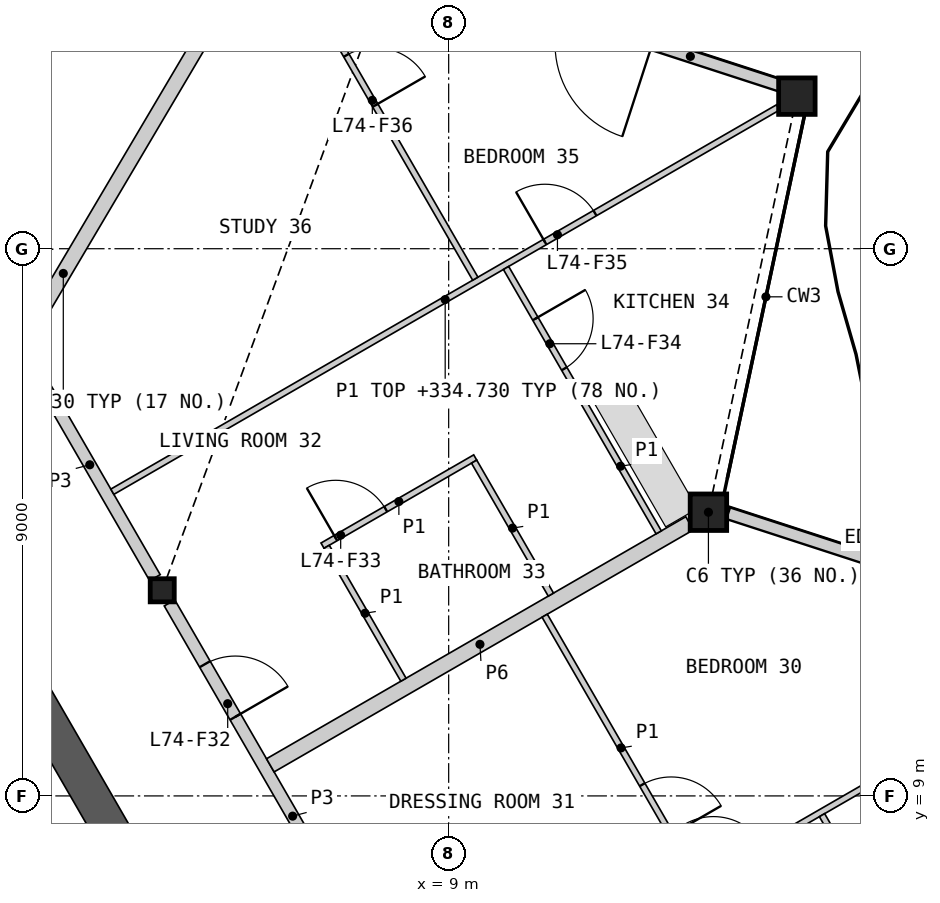
"""IFC4 building model, lengths in metres.
Left out: names, types, materials, properties, quantities, classifications, styles, units other than length and angle.
Written with IfcOpenShell. Run it as: python <this file> out.ifc"""

import sys

from ifc_helpers import new_model, si_unit, direction, frame, frame_2d, origin, origin_2d, place, context, subcontext, project, spatial, rectangle, hollow_rectangle, i_section, extrude, element, fill, save


model = new_model("IFC4")
c1 = context("Model", 3, precision=1e-05, world=origin(), true_north=direction((0.0, 1.0)))
c2 = subcontext(c1, "Body", "Model", "MODEL_VIEW")
j1 = project(units=[si_unit("LENGTHUNIT", "METRE"), si_unit("PLANEANGLEUNIT", "RADIAN")], contexts=[c1])
p1 = place(None, origin())
s1 = spatial("IfcSite", under=j1, at=p1, CompositionType="ELEMENT")
p2 = place(p1, origin())
s2 = spatial("IfcBuilding", under=s1, at=p2, CompositionType="ELEMENT")
p3 = place(p2, frame((0.0, 0.0, 332.4)))
s3 = spatial("IfcBuildingStorey", under=s2, at=p3, CompositionType="ELEMENT", Elevation=332.4)
for number, where, z_axis, x_axis in (
    (1, (13.272, 13.666, 0.0), (0.0, 0.0, 1.0), (1.0, 0.0, 0.0)),
    (2, (14.727, 20.509, 0.0), (0.0, 0.0, 1.0), (1.0, 0.0, 0.0)),
):
    element("IfcColumn", number, at=place(p3, frame(where, z_axis=z_axis, x_axis=x_axis)), inside=s3, PredefinedType="COLUMN", context=c2, shape_type="SweptSolid", body=[
        extrude(hollow_rectangle(XDim=0.6, YDim=0.6, WallThickness=0.04, at=origin_2d()), origin(), (0.0, 0.0, 1.0), 3.4),
    ])
p4 = place(p3, frame((4.289, 12.382, 0.0), z_axis=(0.0, 0.0, 1.0), x_axis=(1.0, 0.0, 0.0)))
e3 = element("IfcColumn", 3, at=p4, inside=s3, PredefinedType="COLUMN", context=c2, shape_type="SweptSolid", body=[
    extrude(i_section(OverallWidth=0.396, OverallDepth=0.381, WebThickness=0.019, FlangeThickness=0.03, at=origin_2d()), origin(), (0.0, 0.0, 1.0), 3.4),
])
p5 = place(p3, frame((19.697, 11.667, 0.0), z_axis=(0.0, 0.0, 1.0), x_axis=(-0.951053926112, 0.309024966026, 0.0)))
e4 = element("IfcWall", 4, at=p5, inside=s3, PredefinedType="SOLIDWALL", context=c2, shape_type="SweptSolid", body=[
    extrude(rectangle(XDim=6.414, YDim=0.2, at=frame_2d((3.207, 0.0))), origin(), (0.0, 0.0, 1.0), 2.488),
])
p6 = place(p5, frame((2.262, 0.0, 0.0)))
e5 = element("IfcOpeningElement", 5, at=p6, cuts=e4, PredefinedType="OPENING", context=c2, shape_type="SweptSolid", body=[
    extrude(rectangle(XDim=1.6, YDim=2.25, at=frame_2d((0.8, 1.125))), frame((0.0, 0.11, 0.0), z_axis=(0.0, -1.0, 0.0), x_axis=(1.0, 0.0, 0.0)), (0.0, 0.0, 1.0), 0.22),
])
p7 = place(p3, frame((14.501, 20.667, 0.0), z_axis=(0.0, 0.0, 1.0), x_axis=(-0.951049165164, 0.309039617915, 0.0)))
e6 = element("IfcWall", 6, at=p7, inside=s3, PredefinedType="SOLIDWALL", context=c2, shape_type="SweptSolid", body=[
    extrude(rectangle(XDim=6.417, YDim=0.2, at=frame_2d((3.208, 0.0))), origin(), (0.0, 0.0, 1.0), 2.488),
])
p8 = place(p7, frame((2.262, 0.0, 0.0)))
e7 = element("IfcOpeningElement", 7, at=p8, cuts=e6, PredefinedType="OPENING", context=c2, shape_type="SweptSolid", body=[
    extrude(rectangle(XDim=1.6, YDim=2.25, at=frame_2d((0.8, 1.125))), frame((0.0, 0.11, 0.0), z_axis=(0.0, -1.0, 0.0), x_axis=(1.0, 0.0, 0.0)), (0.0, 0.0, 1.0), 0.22),
])
p9 = place(p3, frame((8.841, -0.902, 0.0), z_axis=(0.0, 0.0, 1.0), x_axis=(-0.499995618375, 0.866027933502, 0.0)))
e8 = element("IfcWall", 8, at=p9, inside=s3, PredefinedType="SHEAR", context=c2, shape_type="SweptSolid", body=[
    extrude(rectangle(XDim=14.571, YDim=0.6, at=frame_2d((7.285, 0.0))), origin(), (0.0, 0.0, 1.0), 3.1),
])
p10 = place(p3, frame((1.899, 16.303, 0.0), z_axis=(0.0, 0.0, 1.0), x_axis=(0.508895604687, 0.860828242758, 0.0)))
e9 = element("IfcWall", 9, at=p10, inside=s3, PredefinedType="PARTITIONING", context=c2, shape_type="SweptSolid", body=[
    extrude(rectangle(XDim=14.986, YDim=0.25, at=frame_2d((7.493, 0.0))), origin(), (0.0, 0.0, 1.0), 2.33),
])
p11 = place(p3, frame((4.409, 12.174, 0.0), z_axis=(0.0, 0.0, 1.0), x_axis=(0.499984266882, -0.866034487114, 0.0)))
e10 = element("IfcWall", 10, at=p11, inside=s3, PredefinedType="PARTITIONING", context=c2, shape_type="SweptSolid", body=[
    extrude(rectangle(XDim=8.099, YDim=0.2, at=frame_2d((4.049, 0.0))), origin(), (0.0, 0.0, 1.0), 3.1),
])
p12 = place(p11, frame((1.164, 0.0, 0.0)))
e11 = element("IfcOpeningElement", 11, at=p12, cuts=e10, PredefinedType="OPENING", context=c2, shape_type="SweptSolid", body=[
    extrude(rectangle(XDim=1.0, YDim=2.1, at=frame_2d((0.5, 1.05))), frame((0.0, 0.11, 0.0), z_axis=(0.0, -1.0, 0.0), x_axis=(1.0, 0.0, 0.0)), (0.0, 0.0, 1.0), 0.22),
])
p13 = place(p3, frame((6.067, 9.503, 0.0), z_axis=(0.0, 0.0, 1.0), x_axis=(0.866032392051, 0.499987895772, 0.0)))
e12 = element("IfcWall", 12, at=p13, inside=s3, PredefinedType="PARTITIONING", context=c2, shape_type="SweptSolid", body=[
    extrude(rectangle(XDim=7.962, YDim=0.25, at=frame_2d((3.981, 0.0))), origin(), (0.0, 0.0, 1.0), 2.33),
])
p14 = place(p3, frame((2.025, 16.303, 0.0), z_axis=(0.0, 0.0, 1.0), x_axis=(0.499978750566, -0.866037671803, 0.0)))
e13 = element("IfcWall", 13, at=p14, inside=s3, PredefinedType="PARTITIONING", context=c2, shape_type="SweptSolid", body=[
    extrude(rectangle(XDim=4.288, YDim=0.2, at=frame_2d((2.144, 0.0))), origin(), (0.0, 0.0, 1.0), 3.1),
])
p15 = place(p3, frame((3.469, 14.003, 0.0), z_axis=(0.0, 0.0, 1.0), x_axis=(0.866021563384, 0.50000665171, 0.0)))
e14 = element("IfcWall", 14, at=p15, inside=s3, PredefinedType="PARTITIONING", context=c2, shape_type="SweptSolid", body=[
    extrude(rectangle(XDim=12.641, YDim=0.1, at=frame_2d((6.321, 0.0))), origin(), (0.0, 0.0, 1.0), 2.33),
])
p16 = place(p15, frame((8.215, 0.0, 0.0)))
e15 = element("IfcOpeningElement", 15, at=p16, cuts=e14, PredefinedType="OPENING", context=c2, shape_type="SweptSolid", body=[
    extrude(rectangle(XDim=0.95, YDim=2.1, at=frame_2d((0.475, 1.05))), frame((0.0, 0.06, 0.0), z_axis=(0.0, -1.0, 0.0), x_axis=(1.0, 0.0, 0.0)), (0.0, 0.0, 1.0), 0.12),
])
p17 = place(p3, frame((8.786, 5.073, 0.0), z_axis=(0.0, 0.0, 1.0), x_axis=(0.86602139559, 0.500006942333, 0.0)))
e16 = element("IfcWall", 16, at=p17, inside=s3, PredefinedType="PARTITIONING", context=c2, shape_type="SweptSolid", body=[
    extrude(rectangle(XDim=12.505, YDim=0.1, at=frame_2d((6.252, 0.0))), origin(), (0.0, 0.0, 1.0), 2.33),
])
p18 = place(p17, frame((5.275, 0.0, 0.0)))
e17 = element("IfcOpeningElement", 17, at=p18, cuts=e16, PredefinedType="OPENING", context=c2, shape_type="SweptSolid", body=[
    extrude(rectangle(XDim=0.95, YDim=2.1, at=frame_2d((0.475, 1.05))), frame((0.0, 0.06, 0.0), z_axis=(0.0, -1.0, 0.0), x_axis=(1.0, 0.0, 0.0)), (0.0, 0.0, 1.0), 0.12),
])
p19 = place(p3, frame((1.098, 19.16, 0.0), z_axis=(0.0, 0.0, 1.0), x_axis=(0.156426176129, 0.987689653394, 0.0)))
e18 = element("IfcWall", 18, at=p19, inside=s3, PredefinedType="PARTITIONING", context=c2, shape_type="SweptSolid", body=[
    extrude(rectangle(XDim=12.358, YDim=0.1, at=frame_2d((6.179, 0.0))), origin(), (0.0, 0.0, 1.0), 2.33),
])
p20 = place(p19, frame((7.255, 0.0, 0.0)))
e19 = element("IfcOpeningElement", 19, at=p20, cuts=e18, PredefinedType="OPENING", context=c2, shape_type="SweptSolid", body=[
    extrude(rectangle(XDim=0.95, YDim=2.1, at=frame_2d((0.475, 1.05))), frame((0.0, 0.06, 0.0), z_axis=(0.0, -1.0, 0.0), x_axis=(1.0, 0.0, 0.0)), (0.0, 0.0, 1.0), 0.12),
])
p21 = place(p3, frame((6.127, 23.241, 0.0), z_axis=(0.0, 0.0, 1.0), x_axis=(0.500021410345, -0.866013042163, 0.0)))
e20 = element("IfcWall", 20, at=p21, inside=s3, PredefinedType="PARTITIONING", context=c2, shape_type="SweptSolid", body=[
    extrude(rectangle(XDim=6.621, YDim=0.1, at=frame_2d((3.311, 0.0))), origin(), (0.0, 0.0, 1.0), 2.33),
])
p22 = place(p21, frame((2.379, 0.0, 0.0)))
e21 = element("IfcOpeningElement", 21, at=p22, cuts=e20, PredefinedType="OPENING", context=c2, shape_type="SweptSolid", body=[
    extrude(rectangle(XDim=0.95, YDim=2.1, at=frame_2d((0.475, 1.05))), frame((0.0, 0.06, 0.0), z_axis=(0.0, -1.0, 0.0), x_axis=(1.0, 0.0, 0.0)), (0.0, 0.0, 1.0), 0.12),
])
p23 = place(p3, frame((10.579, 11.964, 0.0), z_axis=(0.0, 0.0, 1.0), x_axis=(0.499972176429, -0.866041467135, 0.0)))
e22 = element("IfcWall", 22, at=p23, inside=s3, PredefinedType="PARTITIONING", context=c2, shape_type="SweptSolid", body=[
    extrude(rectangle(XDim=5.021, YDim=0.1, at=frame_2d((2.511, 0.0))), origin(), (0.0, 0.0, 1.0), 2.33),
])
p24 = place(p23, frame((3.209, 0.0, 0.0)))
e23 = element("IfcOpeningElement", 23, at=p24, cuts=e22, PredefinedType="OPENING", context=c2, shape_type="SweptSolid", body=[
    extrude(rectangle(XDim=0.95, YDim=2.1, at=frame_2d((0.475, 1.05))), frame((0.0, 0.06, 0.0), z_axis=(0.0, -1.0, 0.0), x_axis=(1.0, 0.0, 0.0)), (0.0, 0.0, 1.0), 0.12),
])
p25 = place(p3, frame((9.944, 17.684, 0.0), z_axis=(0.0, 0.0, 1.0), x_axis=(0.499972176429, -0.866041467135, 0.0)))
e24 = element("IfcWall", 24, at=p25, inside=s3, PredefinedType="PARTITIONING", context=c2, shape_type="SweptSolid", body=[
    extrude(rectangle(XDim=5.021, YDim=0.1, at=frame_2d((2.511, 0.0))), origin(), (0.0, 0.0, 1.0), 2.33),
])
p26 = place(p25, frame((0.964, 0.0, 0.0)))
e25 = element("IfcOpeningElement", 25, at=p26, cuts=e24, PredefinedType="OPENING", context=c2, shape_type="SweptSolid", body=[
    extrude(rectangle(XDim=0.95, YDim=2.1, at=frame_2d((0.475, 1.05))), frame((0.0, 0.06, 0.0), z_axis=(0.0, -1.0, 0.0), x_axis=(1.0, 0.0, 0.0)), (0.0, 0.0, 1.0), 0.12),
])
p27 = place(p3, frame((15.14, 8.683, 0.0), z_axis=(0.0, 0.0, 1.0), x_axis=(0.499987849973, -0.866032418492, 0.0)))
e26 = element("IfcWall", 26, at=p27, inside=s3, PredefinedType="PARTITIONING", context=c2, shape_type="SweptSolid", body=[
    extrude(rectangle(XDim=5.096, YDim=0.1, at=frame_2d((2.548, 0.0))), origin(), (0.0, 0.0, 1.0), 2.33),
])
p28 = place(p27, frame((0.554, 0.0, 0.0)))
e27 = element("IfcOpeningElement", 27, at=p28, cuts=e26, PredefinedType="OPENING", context=c2, shape_type="SweptSolid", body=[
    extrude(rectangle(XDim=0.95, YDim=2.1, at=frame_2d((0.475, 1.05))), frame((0.0, 0.06, 0.0), z_axis=(0.0, -1.0, 0.0), x_axis=(1.0, 0.0, 0.0)), (0.0, 0.0, 1.0), 0.12),
])
p29 = place(p3, frame((6.925, 13.116, 0.0), z_axis=(0.0, 0.0, 1.0), x_axis=(0.866032775405, 0.499987231761, 0.0)))
e28 = element("IfcWall", 28, at=p29, inside=s3, PredefinedType="PARTITIONING", context=c2, shape_type="SweptSolid", body=[
    extrude(rectangle(XDim=2.9, YDim=0.1, at=frame_2d((1.45, 0.0))), origin(), (0.0, 0.0, 1.0), 2.33),
])
p30 = place(p29, frame((0.25, 0.0, 0.0)))
e29 = element("IfcOpeningElement", 29, at=p30, cuts=e28, PredefinedType="OPENING", context=c2, shape_type="SweptSolid", body=[
    extrude(rectangle(XDim=0.95, YDim=2.1, at=frame_2d((0.475, 1.05))), frame((0.0, 0.06, 0.0), z_axis=(0.0, -1.0, 0.0), x_axis=(1.0, 0.0, 0.0)), (0.0, 0.0, 1.0), 0.12),
])
for number, where, z_axis, x_axis in (
    (30, (9.418, 14.498, 0.0), (0.0, 0.0, 1.0), (0.5, -0.866, 0.0)),
    (31, (6.994, 13.098, 0.0), (0.0, 0.0, 1.0), (0.5, -0.866, 0.0)),
):
    element("IfcWall", number, at=place(p3, frame(where, z_axis=z_axis, x_axis=x_axis)), inside=s3, PredefinedType="PARTITIONING", context=c2, shape_type="SweptSolid", body=[
        extrude(rectangle(XDim=2.525, YDim=0.1, at=frame_2d((1.262, 0.0))), origin(), (0.0, 0.0, 1.0), 2.33),
    ])
p31 = place(p24, origin())
e32 = element("IfcDoor", 32, at=p31, inside=s3, OperationType="SINGLE_SWING_RIGHT", PredefinedType="DOOR", context=c2, shape_type="SweptSolid", body=[
    extrude(rectangle(XDim=0.95, YDim=2.1, at=frame_2d((0.475, 1.05))), frame((0.0, 0.025, 0.0), z_axis=(0.0, -1.0, 0.0), x_axis=(1.0, 0.0, 0.0)), (0.0, 0.0, 1.0), 0.05),
])
fill(e23, e32)
p32 = place(p12, origin())
e33 = element("IfcDoor", 33, at=p32, inside=s3, OperationType="SINGLE_SWING_RIGHT", PredefinedType="DOOR", context=c2, shape_type="SweptSolid", body=[
    extrude(rectangle(XDim=1.0, YDim=2.1, at=frame_2d((0.5, 1.05))), frame((0.0, 0.025, 0.0), z_axis=(0.0, -1.0, 0.0), x_axis=(1.0, 0.0, 0.0)), (0.0, 0.0, 1.0), 0.05),
])
fill(e11, e33)
p33 = place(p30, origin())
e34 = element("IfcDoor", 34, at=p33, inside=s3, OperationType="SINGLE_SWING_LEFT", PredefinedType="DOOR", context=c2, shape_type="SweptSolid", body=[
    extrude(rectangle(XDim=0.95, YDim=2.1, at=frame_2d((0.475, 1.05))), frame((0.0, 0.025, 0.0), z_axis=(0.0, -1.0, 0.0), x_axis=(1.0, 0.0, 0.0)), (0.0, 0.0, 1.0), 0.05),
])
fill(e29, e34)
p34 = place(p26, origin())
e35 = element("IfcDoor", 35, at=p34, inside=s3, OperationType="SINGLE_SWING_LEFT", PredefinedType="DOOR", context=c2, shape_type="SweptSolid", body=[
    extrude(rectangle(XDim=0.95, YDim=2.1, at=frame_2d((0.475, 1.05))), frame((0.0, 0.025, 0.0), z_axis=(0.0, -1.0, 0.0), x_axis=(1.0, 0.0, 0.0)), (0.0, 0.0, 1.0), 0.05),
])
fill(e25, e35)
p35 = place(p16, origin())
e36 = element("IfcDoor", 36, at=p35, inside=s3, OperationType="SINGLE_SWING_LEFT", PredefinedType="DOOR", context=c2, shape_type="SweptSolid", body=[
    extrude(rectangle(XDim=0.95, YDim=2.1, at=frame_2d((0.475, 1.05))), frame((0.0, 0.025, 0.0), z_axis=(0.0, -1.0, 0.0), x_axis=(1.0, 0.0, 0.0)), (0.0, 0.0, 1.0), 0.05),
])
fill(e15, e36)
p36 = place(p22, origin())
e37 = element("IfcDoor", 37, at=p36, inside=s3, OperationType="SINGLE_SWING_RIGHT", PredefinedType="DOOR", context=c2, shape_type="SweptSolid", body=[
    extrude(rectangle(XDim=0.95, YDim=2.1, at=frame_2d((0.475, 1.05))), frame((0.0, 0.025, 0.0), z_axis=(0.0, -1.0, 0.0), x_axis=(1.0, 0.0, 0.0)), (0.0, 0.0, 1.0), 0.05),
])
fill(e21, e37)
save(model, sys.argv[1])
